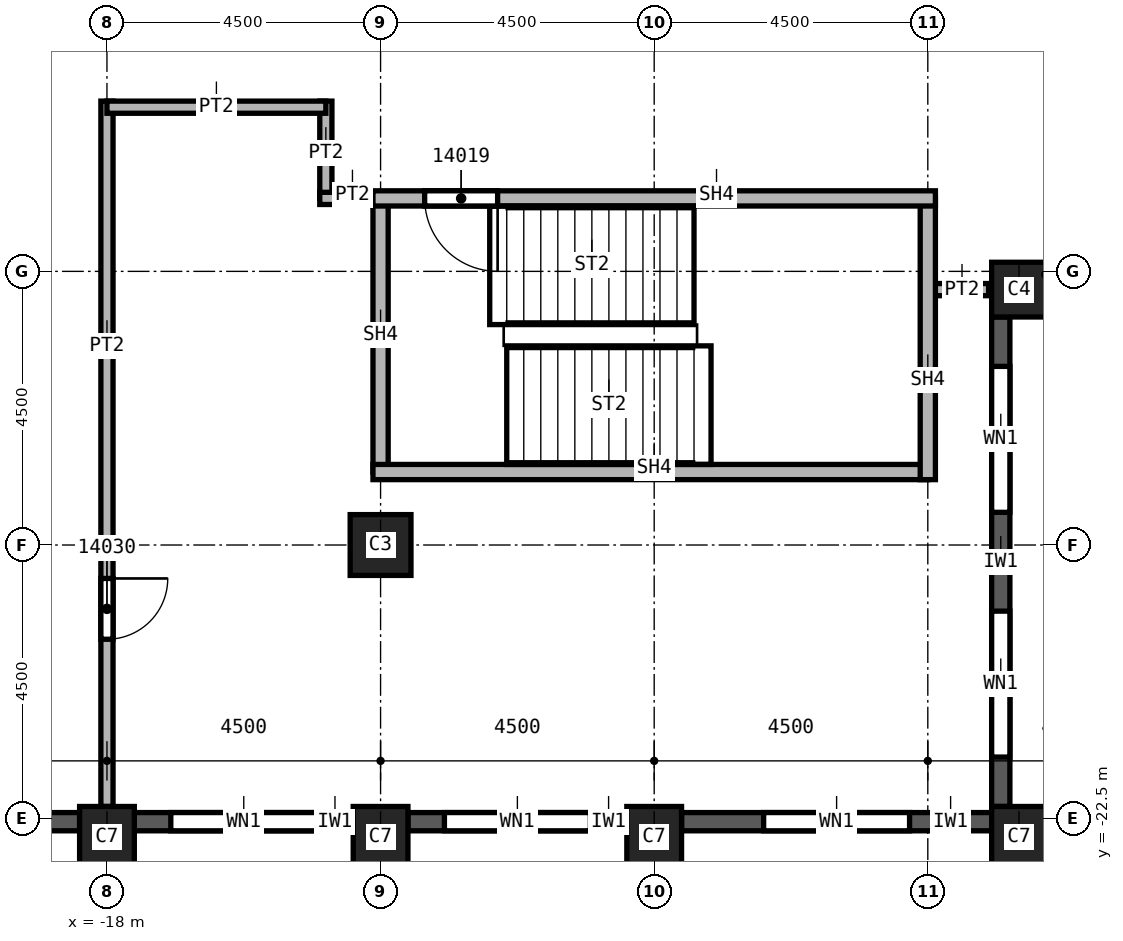
"""IFC4 building model, lengths in metres.
Left out: names, types, materials, properties, quantities, classifications, styles, units other than length and angle.
Written with IfcOpenShell. Run it as: python <this file> out.ifc"""

import sys

from ifc_helpers import new_model, si_unit, direction, frame, frame_2d, origin, origin_2d, place, context, subcontext, project, spatial, rectangle, extrude, element, fill, save


model = new_model("IFC4")
c1 = context("Model", 3, precision=1e-05, world=origin(), true_north=direction((0.0, 1.0)))
c2 = subcontext(c1, "Body", "Model", "MODEL_VIEW")
j1 = project(units=[si_unit("LENGTHUNIT", "METRE"), si_unit("PLANEANGLEUNIT", "RADIAN")], contexts=[c1])
p1 = place(None, origin())
s1 = spatial("IfcSite", under=j1, at=p1, CompositionType="ELEMENT")
p2 = place(p1, origin())
s2 = spatial("IfcBuilding", under=s1, at=p2, CompositionType="ELEMENT")
p3 = place(p2, frame((0.0, 0.0, 224.0)))
s3 = spatial("IfcBuildingStorey", under=s2, at=p3, CompositionType="ELEMENT", Elevation=224.0)
p4 = place(p3, frame((-13.5, -18.0, 0.0), z_axis=(0.0, 0.0, 1.0), x_axis=(1.0, 0.0, 0.0)))
e1 = element("IfcColumn", 1, at=p4, inside=s3, PredefinedType="COLUMN", context=c2, shape_type="SweptSolid", body=[
    extrude(rectangle(XDim=1.0, YDim=1.0, at=origin_2d()), origin(), (0.0, 0.0, 1.0), 3.72),
])
for number, where, z_axis, x_axis in (
    (2, (-3.0, -22.8, 0.0), (0.0, 0.0, 1.0), (1.0, 0.0, 0.0)),
    (3, (-9.0, -22.8, 0.0), (0.0, 0.0, 1.0), (1.0, 0.0, 0.0)),
    (4, (-13.5, -22.8, 0.0), (0.0, 0.0, 1.0), (1.0, 0.0, 0.0)),
    (5, (-18.0, -22.8, 0.0), (0.0, 0.0, 1.0), (1.0, 0.0, 0.0)),
):
    element("IfcColumn", number, at=place(p3, frame(where, z_axis=z_axis, x_axis=x_axis)), inside=s3, PredefinedType="COLUMN", context=c2, shape_type="SweptSolid", body=[
        extrude(rectangle(XDim=0.9, YDim=1.0, at=origin_2d()), origin(), (0.0, 0.0, 1.0), 3.72),
    ])
p5 = place(p3, frame((-3.0, -13.8, 0.0), z_axis=(0.0, 0.0, 1.0), x_axis=(1.0, 0.0, 0.0)))
e6 = element("IfcColumn", 6, at=p5, inside=s3, PredefinedType="COLUMN", context=c2, shape_type="SweptSolid", body=[
    extrude(rectangle(XDim=0.9, YDim=0.9, at=origin_2d()), origin(), (0.0, 0.0, 1.0), 3.72),
])
p6 = place(p3, frame((-22.05, -22.55, 0.0), z_axis=(0.0, 0.0, 1.0), x_axis=(1.0, 0.0, 0.0)))
e7 = element("IfcWall", 7, at=p6, inside=s3, PredefinedType="SOLIDWALL", context=c2, shape_type="SweptSolid", body=[
    extrude(rectangle(XDim=3.6, YDim=0.3, at=frame_2d((1.8, 0.0))), origin(), (0.0, 0.0, 1.0), 3.12),
])
p7 = place(p6, frame((0.775, 0.0, 0.8)))
e8 = element("IfcOpeningElement", 8, at=p7, cuts=e7, PredefinedType="OPENING", context=c2, shape_type="SweptSolid", body=[
    extrude(rectangle(XDim=1.0, YDim=1.95, at=frame_2d((0.5, 0.975))), frame((0.0, 0.15, 0.0), z_axis=(0.0, -1.0, 0.0), x_axis=(1.0, 0.0, 0.0)), (0.0, 0.0, 1.0), 0.3),
])
p8 = place(p6, frame((2.375, 0.0, 0.8)))
e9 = element("IfcOpeningElement", 9, at=p8, cuts=e7, PredefinedType="OPENING", context=c2, shape_type="SweptSolid", body=[
    extrude(rectangle(XDim=0.6, YDim=1.95, at=frame_2d((0.3, 0.975))), frame((0.0, 0.15, 0.0), z_axis=(0.0, -1.0, 0.0), x_axis=(1.0, 0.0, 0.0)), (0.0, 0.0, 1.0), 0.3),
])
p9 = place(p3, frame((-17.55, -22.55, 0.0), z_axis=(0.0, 0.0, 1.0), x_axis=(1.0, 0.0, 0.0)))
e10 = element("IfcWall", 10, at=p9, inside=s3, PredefinedType="SOLIDWALL", context=c2, shape_type="SweptSolid", body=[
    extrude(rectangle(XDim=3.6, YDim=0.3, at=frame_2d((1.8, 0.0))), origin(), (0.0, 0.0, 1.0), 3.12),
])
p10 = place(p9, frame((0.6, 0.0, 0.8)))
e11 = element("IfcOpeningElement", 11, at=p10, cuts=e10, PredefinedType="OPENING", context=c2, shape_type="SweptSolid", body=[
    extrude(rectangle(XDim=2.4, YDim=1.95, at=frame_2d((1.2, 0.975))), frame((0.0, 0.15, 0.0), z_axis=(0.0, -1.0, 0.0), x_axis=(1.0, 0.0, 0.0)), (0.0, 0.0, 1.0), 0.3),
])
p11 = place(p3, frame((-13.05, -22.55, 0.0), z_axis=(0.0, 0.0, 1.0), x_axis=(1.0, 0.0, 0.0)))
e12 = element("IfcWall", 12, at=p11, inside=s3, PredefinedType="SOLIDWALL", context=c2, shape_type="SweptSolid", body=[
    extrude(rectangle(XDim=3.6, YDim=0.3, at=frame_2d((1.8, 0.0))), origin(), (0.0, 0.0, 1.0), 3.12),
])
p12 = place(p11, frame((0.6, 0.0, 0.8)))
e13 = element("IfcOpeningElement", 13, at=p12, cuts=e12, PredefinedType="OPENING", context=c2, shape_type="SweptSolid", body=[
    extrude(rectangle(XDim=2.4, YDim=1.95, at=frame_2d((1.2, 0.975))), frame((0.0, 0.15, 0.0), z_axis=(0.0, -1.0, 0.0), x_axis=(1.0, 0.0, 0.0)), (0.0, 0.0, 1.0), 0.3),
])
p13 = place(p3, frame((-8.55, -22.55, 0.0), z_axis=(0.0, 0.0, 1.0), x_axis=(1.0, 0.0, 0.0)))
e14 = element("IfcWall", 14, at=p13, inside=s3, PredefinedType="SOLIDWALL", context=c2, shape_type="SweptSolid", body=[
    extrude(rectangle(XDim=5.1, YDim=0.3, at=frame_2d((2.55, 0.0))), origin(), (0.0, 0.0, 1.0), 3.12),
])
p14 = place(p13, frame((1.35, 0.0, 0.8)))
e15 = element("IfcOpeningElement", 15, at=p14, cuts=e14, PredefinedType="OPENING", context=c2, shape_type="SweptSolid", body=[
    extrude(rectangle(XDim=2.4, YDim=1.95, at=frame_2d((1.2, 0.975))), frame((0.0, 0.15, 0.0), z_axis=(0.0, -1.0, 0.0), x_axis=(1.0, 0.0, 0.0)), (0.0, 0.0, 1.0), 0.3),
])
p15 = place(p3, frame((-3.3, -22.3, 0.0), z_axis=(0.0, 0.0, 1.0), x_axis=(0.0, 1.0, 0.0)))
e16 = element("IfcWall", 16, at=p15, inside=s3, PredefinedType="SOLIDWALL", context=c2, shape_type="SweptSolid", body=[
    extrude(rectangle(XDim=8.05, YDim=0.3, at=frame_2d((4.025, 0.0))), origin(), (0.0, 0.0, 1.0), 3.12),
])
p16 = place(p15, frame((0.812, 0.0, 0.8)))
e17 = element("IfcOpeningElement", 17, at=p16, cuts=e16, PredefinedType="OPENING", context=c2, shape_type="SweptSolid", body=[
    extrude(rectangle(XDim=2.4, YDim=1.95, at=frame_2d((1.2, 0.975))), frame((0.0, 0.15, 0.0), z_axis=(0.0, -1.0, 0.0), x_axis=(1.0, 0.0, 0.0)), (0.0, 0.0, 1.0), 0.3),
])
p17 = place(p15, frame((4.837, 0.0, 0.8)))
e18 = element("IfcOpeningElement", 18, at=p17, cuts=e16, PredefinedType="OPENING", context=c2, shape_type="SweptSolid", body=[
    extrude(rectangle(XDim=2.4, YDim=1.95, at=frame_2d((1.2, 0.975))), frame((0.0, 0.15, 0.0), z_axis=(0.0, -1.0, 0.0), x_axis=(1.0, 0.0, 0.0)), (0.0, 0.0, 1.0), 0.3),
])
p18 = place(p3, frame((-18.0, -10.7, 0.0), z_axis=(0.0, 0.0, 1.0), x_axis=(0.0, -1.0, 0.0)))
e19 = element("IfcWall", 19, at=p18, inside=s3, PredefinedType="PARTITIONING", context=c2, shape_type="SweptSolid", body=[
    extrude(rectangle(XDim=11.6, YDim=0.2, at=frame_2d((5.8, 0.0))), origin(), (0.0, 0.0, 1.0), 3.72),
])
p19 = place(p18, frame((7.85, 0.0, 0.0)))
e20 = element("IfcOpeningElement", 20, at=p19, cuts=e19, PredefinedType="OPENING", context=c2, shape_type="SweptSolid", body=[
    extrude(rectangle(XDim=1.0, YDim=2.1, at=frame_2d((0.5, 1.05))), frame((0.0, 0.1, 0.0), z_axis=(0.0, -1.0, 0.0), x_axis=(1.0, 0.0, 0.0)), (0.0, 0.0, 1.0), 0.2),
])
p20 = place(p3, frame((-14.4, -12.3, 0.0), z_axis=(0.0, 0.0, 1.0), x_axis=(0.0, 1.0, 0.0)))
e21 = element("IfcWall", 21, at=p20, inside=s3, PredefinedType="PARTITIONING", context=c2, shape_type="SweptSolid", body=[
    extrude(rectangle(XDim=1.6, YDim=0.2, at=frame_2d((0.8, 0.0))), origin(), (0.0, 0.0, 1.0), 3.72),
])
p21 = place(p3, frame((-14.4, -10.8, 0.0), z_axis=(0.0, 0.0, 1.0), x_axis=(-1.0, 0.0, 0.0)))
e22 = element("IfcWall", 22, at=p21, inside=s3, PredefinedType="PARTITIONING", context=c2, shape_type="SweptSolid", body=[
    extrude(rectangle(XDim=3.6, YDim=0.2, at=frame_2d((1.8, 0.0))), origin(), (0.0, 0.0, 1.0), 3.72),
])
p22 = place(p3, frame((-13.375, -12.3, 0.0), z_axis=(0.0, 0.0, 1.0), x_axis=(-1.0, 0.0, 0.0)))
e23 = element("IfcWall", 23, at=p22, inside=s3, PredefinedType="PARTITIONING", context=c2, shape_type="SweptSolid", body=[
    extrude(rectangle(XDim=1.125, YDim=0.2, at=frame_2d((0.562, 0.0))), origin(), (0.0, 0.0, 1.0), 3.72),
])
p23 = place(p3, frame((-3.5, -13.8, 0.0), z_axis=(0.0, 0.0, 1.0), x_axis=(-1.0, 0.0, 0.0)))
e24 = element("IfcWall", 24, at=p23, inside=s3, PredefinedType="PARTITIONING", context=c2, shape_type="SweptSolid", body=[
    extrude(rectangle(XDim=1.0, YDim=0.2, at=frame_2d((0.5, 0.0))), origin(), (0.0, 0.0, 1.0), 3.72),
])
p24 = place(p3, frame((-13.5, -16.8, 0.0), z_axis=(0.0, 0.0, 1.0), x_axis=(0.0, 1.0, 0.0)))
e25 = element("IfcWall", 25, at=p24, inside=s3, PredefinedType="SOLIDWALL", context=c2, shape_type="SweptSolid", body=[
    extrude(rectangle(XDim=4.5, YDim=0.25, at=frame_2d((2.25, 0.0))), origin(), (0.0, 0.0, 1.0), 3.72),
])
p25 = place(p3, frame((-4.5, -16.8, 0.0), z_axis=(0.0, 0.0, 1.0), x_axis=(-1.0, 0.0, 0.0)))
e26 = element("IfcWall", 26, at=p25, inside=s3, PredefinedType="SOLIDWALL", context=c2, shape_type="SweptSolid", body=[
    extrude(rectangle(XDim=9.125, YDim=0.25, at=frame_2d((4.562, 0.0))), origin(), (0.0, 0.0, 1.0), 3.72),
])
p26 = place(p3, frame((-4.5, -12.3, 0.0), z_axis=(0.0, 0.0, 1.0), x_axis=(0.0, -1.0, 0.0)))
e27 = element("IfcWall", 27, at=p26, inside=s3, PredefinedType="SOLIDWALL", context=c2, shape_type="SweptSolid", body=[
    extrude(rectangle(XDim=4.625, YDim=0.25, at=frame_2d((2.312, 0.0))), origin(), (0.0, 0.0, 1.0), 3.72),
])
p27 = place(p3, frame((-4.375, -12.3, 0.0), z_axis=(0.0, 0.0, 1.0), x_axis=(-1.0, 0.0, 0.0)))
e28 = element("IfcWall", 28, at=p27, inside=s3, PredefinedType="SOLIDWALL", context=c2, shape_type="SweptSolid", body=[
    extrude(rectangle(XDim=9.25, YDim=0.25, at=frame_2d((4.625, 0.0))), origin(), (0.0, 0.0, 1.0), 3.72),
])
p28 = place(p27, frame((7.2, 0.0, 0.0)))
e29 = element("IfcOpeningElement", 29, at=p28, cuts=e28, PredefinedType="OPENING", context=c2, shape_type="SweptSolid", body=[
    extrude(rectangle(XDim=1.2, YDim=2.1, at=frame_2d((0.6, 1.05))), frame((0.0, 0.125, 0.0), z_axis=(0.0, -1.0, 0.0), x_axis=(1.0, 0.0, 0.0)), (0.0, 0.0, 1.0), 0.25),
])
p29 = place(p10, origin())
e30 = element("IfcWindow", 30, at=p29, inside=s3, PartitioningType="SINGLE_PANEL", PredefinedType="WINDOW", context=c2, shape_type="SweptSolid", body=[
    extrude(rectangle(XDim=2.4, YDim=1.95, at=frame_2d((1.2, 0.975))), frame((0.0, 0.03, 0.0), z_axis=(0.0, -1.0, 0.0), x_axis=(1.0, 0.0, 0.0)), (0.0, 0.0, 1.0), 0.06),
])
fill(e11, e30)
p30 = place(p12, origin())
e31 = element("IfcWindow", 31, at=p30, inside=s3, PartitioningType="SINGLE_PANEL", PredefinedType="WINDOW", context=c2, shape_type="SweptSolid", body=[
    extrude(rectangle(XDim=2.4, YDim=1.95, at=frame_2d((1.2, 0.975))), frame((0.0, 0.03, 0.0), z_axis=(0.0, -1.0, 0.0), x_axis=(1.0, 0.0, 0.0)), (0.0, 0.0, 1.0), 0.06),
])
fill(e13, e31)
p31 = place(p14, origin())
e32 = element("IfcWindow", 32, at=p31, inside=s3, PartitioningType="SINGLE_PANEL", PredefinedType="WINDOW", context=c2, shape_type="SweptSolid", body=[
    extrude(rectangle(XDim=2.4, YDim=1.95, at=frame_2d((1.2, 0.975))), frame((0.0, 0.03, 0.0), z_axis=(0.0, -1.0, 0.0), x_axis=(1.0, 0.0, 0.0)), (0.0, 0.0, 1.0), 0.06),
])
fill(e15, e32)
p32 = place(p16, origin())
e33 = element("IfcWindow", 33, at=p32, inside=s3, PartitioningType="SINGLE_PANEL", PredefinedType="WINDOW", context=c2, shape_type="SweptSolid", body=[
    extrude(rectangle(XDim=2.4, YDim=1.95, at=frame_2d((1.2, 0.975))), frame((0.0, 0.03, 0.0), z_axis=(0.0, -1.0, 0.0), x_axis=(1.0, 0.0, 0.0)), (0.0, 0.0, 1.0), 0.06),
])
fill(e17, e33)
p33 = place(p17, origin())
e34 = element("IfcWindow", 34, at=p33, inside=s3, PartitioningType="SINGLE_PANEL", PredefinedType="WINDOW", context=c2, shape_type="SweptSolid", body=[
    extrude(rectangle(XDim=2.4, YDim=1.95, at=frame_2d((1.2, 0.975))), frame((0.0, 0.03, 0.0), z_axis=(0.0, -1.0, 0.0), x_axis=(1.0, 0.0, 0.0)), (0.0, 0.0, 1.0), 0.06),
])
fill(e18, e34)
p34 = place(p28, origin())
e35 = element("IfcDoor", 35, at=p34, inside=s3, OperationType="SINGLE_SWING_RIGHT", PredefinedType="DOOR", context=c2, shape_type="SweptSolid", body=[
    extrude(rectangle(XDim=1.2, YDim=2.1, at=frame_2d((0.6, 1.05))), frame((0.0, 0.025, 0.0), z_axis=(0.0, -1.0, 0.0), x_axis=(1.0, 0.0, 0.0)), (0.0, 0.0, 1.0), 0.05),
])
fill(e29, e35)
p35 = place(p19, origin())
e36 = element("IfcDoor", 36, at=p35, inside=s3, OperationType="SINGLE_SWING_LEFT", PredefinedType="DOOR", context=c2, shape_type="SweptSolid", body=[
    extrude(rectangle(XDim=1.0, YDim=2.1, at=frame_2d((0.5, 1.05))), frame((0.0, 0.025, 0.0), z_axis=(0.0, -1.0, 0.0), x_axis=(1.0, 0.0, 0.0)), (0.0, 0.0, 1.0), 0.05),
])
fill(e20, e36)
save(model, sys.argv[1])
